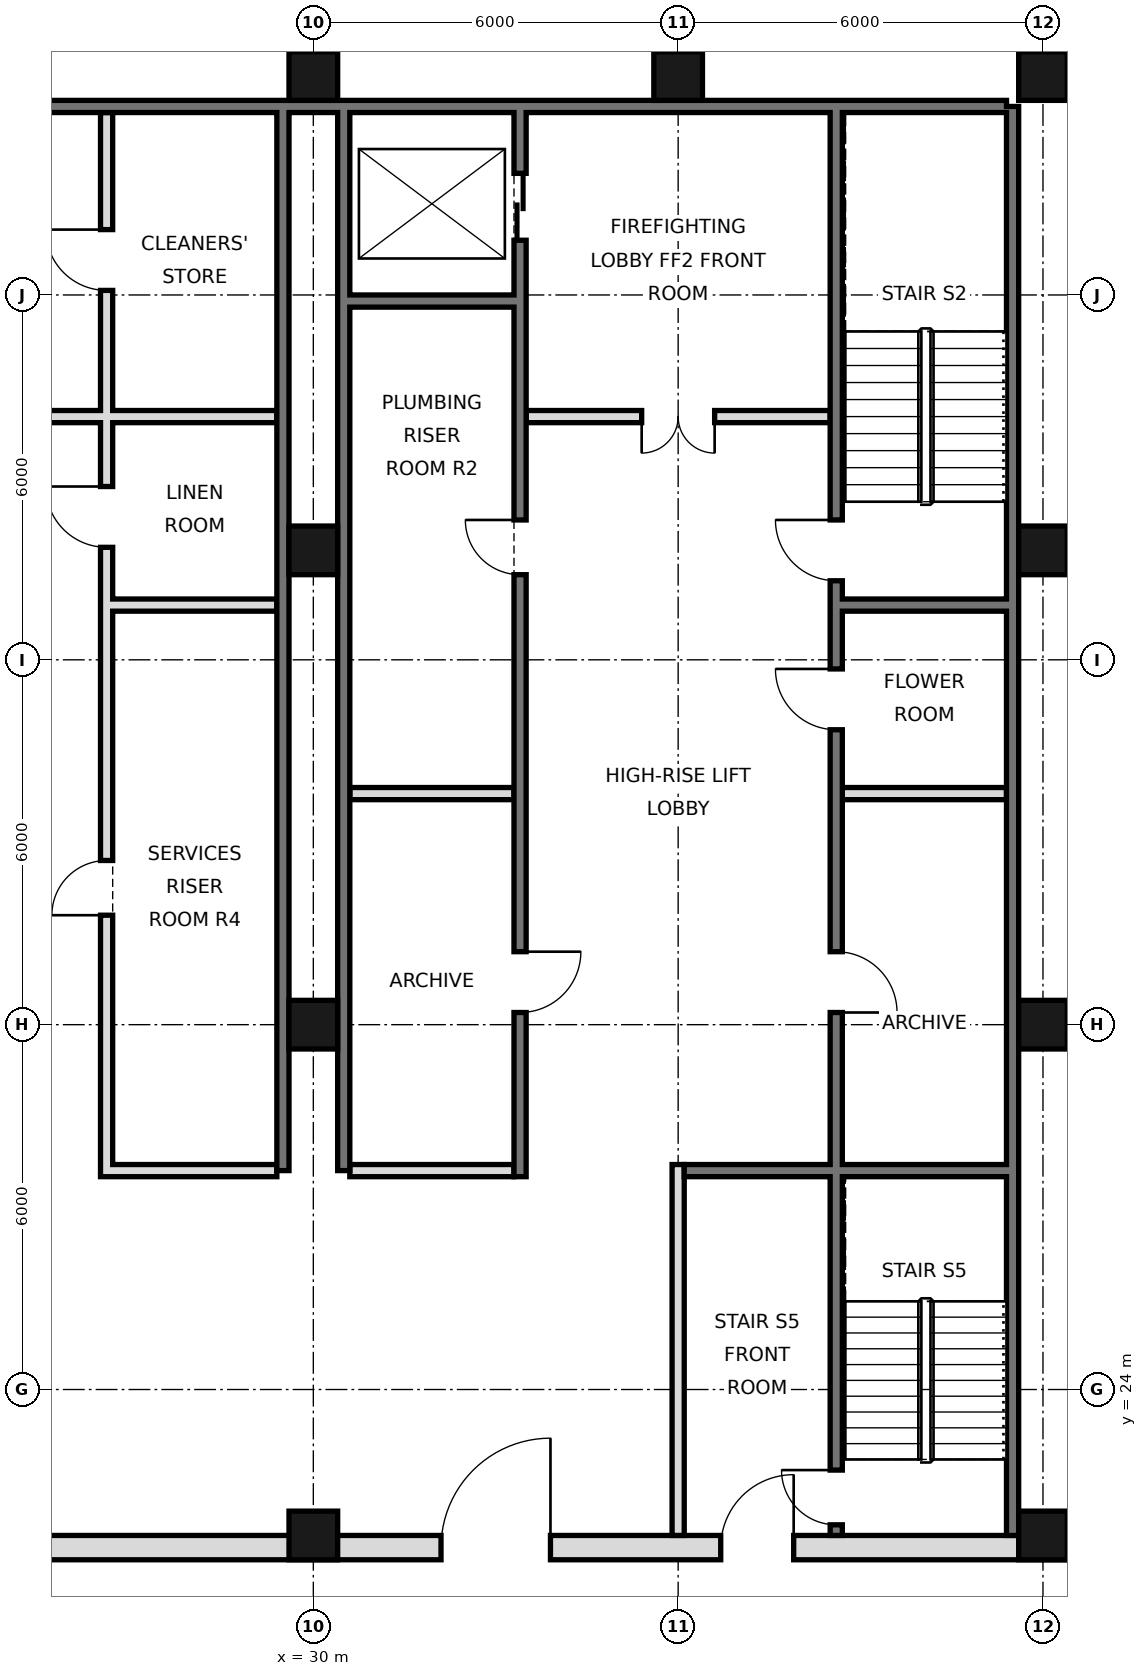
"""IFC4 building model, lengths in metres.
Left out: names, types, materials, properties, quantities, classifications, styles, units other than length and angle.
Written with IfcOpenShell. Run it as: python <this file> out.ifc"""

import sys

from ifc_helpers import new_model, si_unit, direction, frame, frame_2d, origin, origin_2d, place, context, subcontext, project, spatial, rectangle, hollow_rectangle, extrude, element, fill, save


model = new_model("IFC4")
c1 = context("Model", 3, precision=1e-05, world=origin(), true_north=direction((0.0, 1.0)))
c2 = subcontext(c1, "Body", "Model", "MODEL_VIEW")
j1 = project(units=[si_unit("LENGTHUNIT", "METRE"), si_unit("PLANEANGLEUNIT", "RADIAN")], contexts=[c1])
p1 = place(None, origin())
s1 = spatial("IfcSite", under=j1, at=p1, CompositionType="ELEMENT")
p2 = place(p1, origin())
s2 = spatial("IfcBuilding", under=s1, at=p2, CompositionType="ELEMENT")
p3 = place(p2, frame((0.0, 0.0, 49.8)))
s3 = spatial("IfcBuildingStorey", under=s2, at=p3, CompositionType="ELEMENT", Elevation=49.8)
for number, where, z_axis, x_axis in (
    (1, (30.0, 21.6, 0.0), (0.0, 0.0, 1.0), (1.0, 0.0, 0.0)),
    (2, (30.0, 30.0, 0.0), (0.0, 0.0, 1.0), (1.0, 0.0, 0.0)),
    (3, (30.0, 37.8, 0.0), (0.0, 0.0, 1.0), (1.0, 0.0, 0.0)),
    (4, (30.0, 45.6, 0.0), (0.0, 0.0, 1.0), (1.0, 0.0, 0.0)),
    (5, (36.0, 45.6, 0.0), (0.0, 0.0, 1.0), (1.0, 0.0, 0.0)),
    (6, (42.0, 21.6, 0.0), (0.0, 0.0, 1.0), (1.0, 0.0, 0.0)),
    (7, (42.0, 30.0, 0.0), (0.0, 0.0, 1.0), (1.0, 0.0, 0.0)),
    (8, (42.0, 37.8, 0.0), (0.0, 0.0, 1.0), (1.0, 0.0, 0.0)),
    (9, (42.0, 45.6, 0.0), (0.0, 0.0, 1.0), (1.0, 0.0, 0.0)),
):
    element("IfcColumn", number, at=place(p3, frame(where, z_axis=z_axis, x_axis=x_axis)), inside=s3, PredefinedType="COLUMN", context=c2, shape_type="SweptSolid", body=[
        extrude(hollow_rectangle(XDim=0.8, YDim=0.8, WallThickness=0.06, at=origin_2d()), origin(), (0.0, 0.0, 1.0), 3.6),
    ])
p4 = place(p3, frame((41.5, 21.6, 0.0), z_axis=(0.0, 0.0, 1.0), x_axis=(0.0, 1.0, 0.0)))
e10 = element("IfcWall", 10, at=p4, inside=s3, PredefinedType="SOLIDWALL", context=c2, shape_type="SweptSolid", body=[
    extrude(rectangle(XDim=23.5, YDim=0.2, at=frame_2d((11.75, 0.0))), origin(), (0.0, 0.0, 1.0), 3.42),
])
p5 = place(p3, frame((6.6, 45.1, 0.0), z_axis=(0.0, 0.0, 1.0), x_axis=(1.0, 0.0, 0.0)))
e11 = element("IfcWall", 11, at=p5, inside=s3, PredefinedType="SOLIDWALL", context=c2, shape_type="SweptSolid", body=[
    extrude(rectangle(XDim=34.8, YDim=0.2, at=frame_2d((17.4, 0.0))), origin(), (0.0, 0.0, 1.0), 3.42),
])
for number, where, z_axis, x_axis in (
    (12, (29.5, 27.6, 0.0), (0.0, 0.0, 1.0), (0.0, 1.0, 0.0)),
    (13, (30.5, 27.6, 0.0), (0.0, 0.0, 1.0), (0.0, 1.0, 0.0)),
):
    element("IfcWall", number, at=place(p3, frame(where, z_axis=z_axis, x_axis=x_axis)), inside=s3, PredefinedType="SOLIDWALL", context=c2, shape_type="SweptSolid", body=[
        extrude(rectangle(XDim=17.5, YDim=0.2, at=frame_2d((8.75, 0.0))), origin(), (0.0, 0.0, 1.0), 3.42),
    ])
p6 = place(p3, frame((5.6, 21.4, 0.0), z_axis=(0.0, 0.0, 1.0), x_axis=(1.0, 0.0, 0.0)))
e14 = element("IfcWall", 14, at=p6, inside=s3, PredefinedType="SOLIDWALL", context=c2, shape_type="SweptSolid", body=[
    extrude(rectangle(XDim=36.8, YDim=0.4, at=frame_2d((18.4, 0.0))), origin(), (0.0, 0.0, 1.0), 3.42),
])
p7 = place(p6, frame((8.5, 0.0, 0.0)))
e15 = element("IfcOpeningElement", 15, at=p7, cuts=e14, PredefinedType="OPENING", context=c2, shape_type="SweptSolid", body=[
    extrude(rectangle(XDim=1.8, YDim=2.1, at=frame_2d((0.9, 1.05))), frame((0.0, 0.21, 0.0), z_axis=(0.0, -1.0, 0.0), x_axis=(1.0, 0.0, 0.0)), (0.0, 0.0, 1.0), 0.42),
])
p8 = place(p6, frame((17.5, 0.0, 0.0)))
e16 = element("IfcOpeningElement", 16, at=p8, cuts=e14, PredefinedType="OPENING", context=c2, shape_type="SweptSolid", body=[
    extrude(rectangle(XDim=1.8, YDim=2.1, at=frame_2d((0.9, 1.05))), frame((0.0, 0.21, 0.0), z_axis=(0.0, -1.0, 0.0), x_axis=(1.0, 0.0, 0.0)), (0.0, 0.0, 1.0), 0.42),
])
p9 = place(p6, frame((26.5, 0.0, 0.0)))
e17 = element("IfcOpeningElement", 17, at=p9, cuts=e14, PredefinedType="OPENING", context=c2, shape_type="SweptSolid", body=[
    extrude(rectangle(XDim=1.8, YDim=2.1, at=frame_2d((0.9, 1.05))), frame((0.0, 0.21, 0.0), z_axis=(0.0, -1.0, 0.0), x_axis=(1.0, 0.0, 0.0)), (0.0, 0.0, 1.0), 0.42),
])
p10 = place(p6, frame((4.5, 0.0, 0.0)))
e18 = element("IfcOpeningElement", 18, at=p10, cuts=e14, PredefinedType="OPENING", context=c2, shape_type="SweptSolid", body=[
    extrude(rectangle(XDim=1.2, YDim=2.1, at=frame_2d((0.6, 1.05))), frame((0.0, 0.21, 0.0), z_axis=(0.0, -1.0, 0.0), x_axis=(1.0, 0.0, 0.0)), (0.0, 0.0, 1.0), 0.42),
])
p11 = place(p6, frame((31.1, 0.0, 0.0)))
e19 = element("IfcOpeningElement", 19, at=p11, cuts=e14, PredefinedType="OPENING", context=c2, shape_type="SweptSolid", body=[
    extrude(rectangle(XDim=1.2, YDim=2.1, at=frame_2d((0.6, 1.05))), frame((0.0, 0.21, 0.0), z_axis=(0.0, -1.0, 0.0), x_axis=(1.0, 0.0, 0.0)), (0.0, 0.0, 1.0), 0.42),
])
p12 = place(p3, frame((26.6, 27.5, 0.0), z_axis=(0.0, 0.0, 1.0), x_axis=(0.0, 1.0, 0.0)))
e20 = element("IfcWall", 20, at=p12, inside=s3, PredefinedType="SOLIDWALL", context=c2, shape_type="SweptSolid", body=[
    extrude(rectangle(XDim=17.5, YDim=0.2, at=frame_2d((8.75, 0.0))), origin(), (0.0, 0.0, 1.0), 3.42),
])
p13 = place(p12, frame((4.3, 0.0, 0.0)))
e21 = element("IfcOpeningElement", 21, at=p13, cuts=e20, PredefinedType="OPENING", context=c2, shape_type="SweptSolid", body=[
    extrude(rectangle(XDim=0.9, YDim=2.1, at=frame_2d((0.45, 1.05))), frame((0.0, 0.11, 0.0), z_axis=(0.0, -1.0, 0.0), x_axis=(1.0, 0.0, 0.0)), (0.0, 0.0, 1.0), 0.22),
])
p14 = place(p12, frame((10.35, 0.0, 0.0)))
e22 = element("IfcOpeningElement", 22, at=p14, cuts=e20, PredefinedType="OPENING", context=c2, shape_type="SweptSolid", body=[
    extrude(rectangle(XDim=1.0, YDim=2.1, at=frame_2d((0.5, 1.05))), frame((0.0, 0.11, 0.0), z_axis=(0.0, -1.0, 0.0), x_axis=(1.0, 0.0, 0.0)), (0.0, 0.0, 1.0), 0.22),
])
p15 = place(p12, frame((14.575, 0.0, 0.0)))
e23 = element("IfcOpeningElement", 23, at=p15, cuts=e20, PredefinedType="OPENING", context=c2, shape_type="SweptSolid", body=[
    extrude(rectangle(XDim=1.0, YDim=2.1, at=frame_2d((0.5, 1.05))), frame((0.0, 0.11, 0.0), z_axis=(0.0, -1.0, 0.0), x_axis=(1.0, 0.0, 0.0)), (0.0, 0.0, 1.0), 0.22),
])
p16 = place(p3, frame((33.4, 27.5, 0.0), z_axis=(0.0, 0.0, 1.0), x_axis=(0.0, 1.0, 0.0)))
e24 = element("IfcWall", 24, at=p16, inside=s3, PredefinedType="SOLIDWALL", context=c2, shape_type="SweptSolid", body=[
    extrude(rectangle(XDim=17.5, YDim=0.2, at=frame_2d((8.75, 0.0))), origin(), (0.0, 0.0, 1.0), 3.42),
])
p17 = place(p16, frame((15.4, 0.0, 0.0)))
e25 = element("IfcOpeningElement", 25, at=p17, cuts=e24, PredefinedType="OPENING", context=c2, shape_type="SweptSolid", body=[
    extrude(rectangle(XDim=1.1, YDim=2.1, at=frame_2d((0.55, 1.05))), frame((0.0, 0.11, 0.0), z_axis=(0.0, -1.0, 0.0), x_axis=(1.0, 0.0, 0.0)), (0.0, 0.0, 1.0), 0.22),
])
p18 = place(p16, frame((2.7, 0.0, 0.0)))
e26 = element("IfcOpeningElement", 26, at=p18, cuts=e24, PredefinedType="OPENING", context=c2, shape_type="SweptSolid", body=[
    extrude(rectangle(XDim=1.0, YDim=2.1, at=frame_2d((0.5, 1.05))), frame((0.0, 0.11, 0.0), z_axis=(0.0, -1.0, 0.0), x_axis=(1.0, 0.0, 0.0)), (0.0, 0.0, 1.0), 0.22),
])
p19 = place(p16, frame((9.9, 0.0, 0.0)))
e27 = element("IfcOpeningElement", 27, at=p19, cuts=e24, PredefinedType="OPENING", context=c2, shape_type="SweptSolid", body=[
    extrude(rectangle(XDim=0.9, YDim=2.1, at=frame_2d((0.45, 1.05))), frame((0.0, 0.11, 0.0), z_axis=(0.0, -1.0, 0.0), x_axis=(1.0, 0.0, 0.0)), (0.0, 0.0, 1.0), 0.22),
])
p20 = place(p3, frame((36.0, 21.6, 0.0), z_axis=(0.0, 0.0, 1.0), x_axis=(0.0, 1.0, 0.0)))
e28 = element("IfcWall", 28, at=p20, inside=s3, PredefinedType="PARTITIONING", context=c2, shape_type="SweptSolid", body=[
    extrude(rectangle(XDim=6.1, YDim=0.2, at=frame_2d((3.05, 0.0))), origin(), (0.0, 0.0, 1.0), 3.42),
])
p21 = place(p3, frame((38.6, 21.6, 0.0), z_axis=(0.0, 0.0, 1.0), x_axis=(0.0, 1.0, 0.0)))
e29 = element("IfcWall", 29, at=p21, inside=s3, PredefinedType="SOLIDWALL", context=c2, shape_type="SweptSolid", body=[
    extrude(rectangle(XDim=23.4, YDim=0.2, at=frame_2d((11.7, 0.0))), origin(), (0.0, 0.0, 1.0), 3.42),
])
p22 = place(p21, frame((8.6, 0.0, 0.0)))
e30 = element("IfcOpeningElement", 30, at=p22, cuts=e29, PredefinedType="OPENING", context=c2, shape_type="SweptSolid", body=[
    extrude(rectangle(XDim=1.0, YDim=2.1, at=frame_2d((0.5, 1.05))), frame((0.0, 0.11, 0.0), z_axis=(0.0, -1.0, 0.0), x_axis=(1.0, 0.0, 0.0)), (0.0, 0.0, 1.0), 0.22),
])
p23 = place(p21, frame((13.25, 0.0, 0.0)))
e31 = element("IfcOpeningElement", 31, at=p23, cuts=e29, PredefinedType="OPENING", context=c2, shape_type="SweptSolid", body=[
    extrude(rectangle(XDim=1.0, YDim=2.1, at=frame_2d((0.5, 1.05))), frame((0.0, 0.11, 0.0), z_axis=(0.0, -1.0, 0.0), x_axis=(1.0, 0.0, 0.0)), (0.0, 0.0, 1.0), 0.22),
])
p24 = place(p21, frame((15.7, 0.0, 0.0)))
e32 = element("IfcOpeningElement", 32, at=p24, cuts=e29, PredefinedType="OPENING", context=c2, shape_type="SweptSolid", body=[
    extrude(rectangle(XDim=1.0, YDim=2.1, at=frame_2d((0.5, 1.05))), frame((0.0, 0.11, 0.0), z_axis=(0.0, -1.0, 0.0), x_axis=(1.0, 0.0, 0.0)), (0.0, 0.0, 1.0), 0.22),
])
p25 = place(p21, frame((0.175, 0.0, 0.0)))
e33 = element("IfcOpeningElement", 33, at=p25, cuts=e29, PredefinedType="OPENING", context=c2, shape_type="SweptSolid", body=[
    extrude(rectangle(XDim=0.9, YDim=2.1, at=frame_2d((0.45, 1.05))), frame((0.0, 0.11, 0.0), z_axis=(0.0, -1.0, 0.0), x_axis=(1.0, 0.0, 0.0)), (0.0, 0.0, 1.0), 0.22),
])
p26 = place(p3, frame((26.7, 27.6, 0.0), z_axis=(0.0, 0.0, 1.0), x_axis=(1.0, 0.0, 0.0)))
e34 = element("IfcWall", 34, at=p26, inside=s3, PredefinedType="SOLIDWALL", context=c2, shape_type="SweptSolid", body=[
    extrude(rectangle(XDim=2.7, YDim=0.2, at=frame_2d((1.35, 0.0))), origin(), (0.0, 0.0, 1.0), 3.42),
])
p27 = place(p3, frame((30.6, 27.6, 0.0), z_axis=(0.0, 0.0, 1.0), x_axis=(1.0, 0.0, 0.0)))
e35 = element("IfcWall", 35, at=p27, inside=s3, PredefinedType="PARTITIONING", context=c2, shape_type="SweptSolid", body=[
    extrude(rectangle(XDim=2.7, YDim=0.2, at=frame_2d((1.35, 0.0))), origin(), (0.0, 0.0, 1.0), 3.42),
])
p28 = place(p3, frame((36.1, 27.6, 0.0), z_axis=(0.0, 0.0, 1.0), x_axis=(1.0, 0.0, 0.0)))
e36 = element("IfcWall", 36, at=p28, inside=s3, PredefinedType="SOLIDWALL", context=c2, shape_type="SweptSolid", body=[
    extrude(rectangle(XDim=5.3, YDim=0.2, at=frame_2d((2.65, 0.0))), origin(), (0.0, 0.0, 1.0), 3.42),
])
p29 = place(p3, frame((30.6, 33.8, 0.0), z_axis=(0.0, 0.0, 1.0), x_axis=(1.0, 0.0, 0.0)))
e37 = element("IfcWall", 37, at=p29, inside=s3, PredefinedType="SOLIDWALL", context=c2, shape_type="SweptSolid", body=[
    extrude(rectangle(XDim=2.7, YDim=0.2, at=frame_2d((1.35, 0.0))), origin(), (0.0, 0.0, 1.0), 3.42),
])
p30 = place(p3, frame((38.7, 33.8, 0.0), z_axis=(0.0, 0.0, 1.0), x_axis=(1.0, 0.0, 0.0)))
e38 = element("IfcWall", 38, at=p30, inside=s3, PredefinedType="PARTITIONING", context=c2, shape_type="SweptSolid", body=[
    extrude(rectangle(XDim=2.7, YDim=0.2, at=frame_2d((1.35, 0.0))), origin(), (0.0, 0.0, 1.0), 3.42),
])
for number, where, z_axis, x_axis in (
    (39, (26.7, 36.9, 0.0), (0.0, 0.0, 1.0), (1.0, 0.0, 0.0)),
    (40, (38.7, 36.9, 0.0), (0.0, 0.0, 1.0), (1.0, 0.0, 0.0)),
):
    element("IfcWall", number, at=place(p3, frame(where, z_axis=z_axis, x_axis=x_axis)), inside=s3, PredefinedType="SOLIDWALL", context=c2, shape_type="SweptSolid", body=[
        extrude(rectangle(XDim=2.7, YDim=0.2, at=frame_2d((1.35, 0.0))), origin(), (0.0, 0.0, 1.0), 3.42),
    ])
p31 = place(p3, frame((21.5, 40.0, 0.0), z_axis=(0.0, 0.0, 1.0), x_axis=(1.0, 0.0, 0.0)))
e41 = element("IfcWall", 41, at=p31, inside=s3, PredefinedType="PARTITIONING", context=c2, shape_type="SweptSolid", body=[
    extrude(rectangle(XDim=7.9, YDim=0.2, at=frame_2d((3.95, 0.0))), origin(), (0.0, 0.0, 1.0), 3.42),
])
p32 = place(p31, frame((1.9, 0.0, 0.0)))
e42 = element("IfcOpeningElement", 42, at=p32, cuts=e41, PredefinedType="OPENING", context=c2, shape_type="SweptSolid", body=[
    extrude(rectangle(XDim=1.2, YDim=2.1, at=frame_2d((0.6, 1.05))), frame((0.0, 0.11, 0.0), z_axis=(0.0, -1.0, 0.0), x_axis=(1.0, 0.0, 0.0)), (0.0, 0.0, 1.0), 0.22),
])
p33 = place(p3, frame((33.5, 40.0, 0.0), z_axis=(0.0, 0.0, 1.0), x_axis=(1.0, 0.0, 0.0)))
e43 = element("IfcWall", 43, at=p33, inside=s3, PredefinedType="PARTITIONING", context=c2, shape_type="SweptSolid", body=[
    extrude(rectangle(XDim=5.0, YDim=0.2, at=frame_2d((2.5, 0.0))), origin(), (0.0, 0.0, 1.0), 3.42),
])
p34 = place(p33, frame((1.9, 0.0, 0.0)))
e44 = element("IfcOpeningElement", 44, at=p34, cuts=e43, PredefinedType="OPENING", context=c2, shape_type="SweptSolid", body=[
    extrude(rectangle(XDim=1.2, YDim=2.1, at=frame_2d((0.6, 1.05))), frame((0.0, 0.11, 0.0), z_axis=(0.0, -1.0, 0.0), x_axis=(1.0, 0.0, 0.0)), (0.0, 0.0, 1.0), 0.22),
])
p35 = place(p3, frame((30.6, 41.9, 0.0), z_axis=(0.0, 0.0, 1.0), x_axis=(1.0, 0.0, 0.0)))
e45 = element("IfcWall", 45, at=p35, inside=s3, PredefinedType="SOLIDWALL", context=c2, shape_type="SweptSolid", body=[
    extrude(rectangle(XDim=2.7, YDim=0.2, at=frame_2d((1.35, 0.0))), origin(), (0.0, 0.0, 1.0), 3.42),
])
p36 = place(p9, frame((1.8, 0.0, 0.0), z_axis=(0.0, 0.0, 1.0), x_axis=(-1.0, 0.0, 0.0)))
e46 = element("IfcDoor", 46, at=p36, inside=s3, OperationType="SINGLE_SWING_LEFT", PredefinedType="DOOR", context=c2, shape_type="SweptSolid", body=[
    extrude(rectangle(XDim=1.8, YDim=2.1, at=frame_2d((0.9, 1.05))), frame((0.0, 0.025, 0.0), z_axis=(0.0, -1.0, 0.0), x_axis=(1.0, 0.0, 0.0)), (0.0, 0.0, 1.0), 0.05),
])
fill(e17, e46)
p37 = place(p11, frame((1.2, 0.0, 0.0), z_axis=(0.0, 0.0, 1.0), x_axis=(-1.0, 0.0, 0.0)))
e47 = element("IfcDoor", 47, at=p37, inside=s3, OperationType="SINGLE_SWING_LEFT", PredefinedType="DOOR", context=c2, shape_type="SweptSolid", body=[
    extrude(rectangle(XDim=1.2, YDim=2.1, at=frame_2d((0.6, 1.05))), frame((0.0, 0.025, 0.0), z_axis=(0.0, -1.0, 0.0), x_axis=(1.0, 0.0, 0.0)), (0.0, 0.0, 1.0), 0.05),
])
fill(e19, e47)
p38 = place(p34, frame((1.2, 0.0, 0.0), z_axis=(0.0, 0.0, 1.0), x_axis=(-1.0, 0.0, 0.0)))
e48 = element("IfcDoor", 48, at=p38, inside=s3, OperationType="DOUBLE_DOOR_SINGLE_SWING", PredefinedType="DOOR", context=c2, shape_type="SweptSolid", body=[
    extrude(rectangle(XDim=1.2, YDim=2.1, at=frame_2d((0.6, 1.05))), frame((0.0, 0.025, 0.0), z_axis=(0.0, -1.0, 0.0), x_axis=(1.0, 0.0, 0.0)), (0.0, 0.0, 1.0), 0.05),
])
fill(e44, e48)
p39 = place(p17, origin())
e49 = element("IfcDoor", 49, at=p39, inside=s3, OperationType="DOUBLE_DOOR_SLIDING", PredefinedType="DOOR", context=c2, shape_type="SweptSolid", body=[
    extrude(rectangle(XDim=1.1, YDim=2.1, at=frame_2d((0.55, 1.05))), frame((0.0, 0.025, 0.0), z_axis=(0.0, -1.0, 0.0), x_axis=(1.0, 0.0, 0.0)), (0.0, 0.0, 1.0), 0.05),
])
fill(e25, e49)
p40 = place(p22, frame((1.0, 0.0, 0.0), z_axis=(0.0, 0.0, 1.0), x_axis=(-1.0, 0.0, 0.0)))
e50 = element("IfcDoor", 50, at=p40, inside=s3, OperationType="SINGLE_SWING_RIGHT", PredefinedType="DOOR", context=c2, shape_type="SweptSolid", body=[
    extrude(rectangle(XDim=1.0, YDim=2.1, at=frame_2d((0.5, 1.05))), frame((0.0, 0.025, 0.0), z_axis=(0.0, -1.0, 0.0), x_axis=(1.0, 0.0, 0.0)), (0.0, 0.0, 1.0), 0.05),
])
fill(e30, e50)
p41 = place(p23, frame((1.0, 0.0, 0.0), z_axis=(0.0, 0.0, 1.0), x_axis=(-1.0, 0.0, 0.0)))
e51 = element("IfcDoor", 51, at=p41, inside=s3, OperationType="SINGLE_SWING_LEFT", PredefinedType="DOOR", context=c2, shape_type="SweptSolid", body=[
    extrude(rectangle(XDim=1.0, YDim=2.1, at=frame_2d((0.5, 1.05))), frame((0.0, 0.025, 0.0), z_axis=(0.0, -1.0, 0.0), x_axis=(1.0, 0.0, 0.0)), (0.0, 0.0, 1.0), 0.05),
])
fill(e31, e51)
p42 = place(p18, origin())
e52 = element("IfcDoor", 52, at=p42, inside=s3, OperationType="SINGLE_SWING_RIGHT", PredefinedType="DOOR", context=c2, shape_type="SweptSolid", body=[
    extrude(rectangle(XDim=1.0, YDim=2.1, at=frame_2d((0.5, 1.05))), frame((0.0, 0.025, 0.0), z_axis=(0.0, -1.0, 0.0), x_axis=(1.0, 0.0, 0.0)), (0.0, 0.0, 1.0), 0.05),
])
fill(e26, e52)
p43 = place(p24, frame((1.0, 0.0, 0.0), z_axis=(0.0, 0.0, 1.0), x_axis=(-1.0, 0.0, 0.0)))
e53 = element("IfcDoor", 53, at=p43, inside=s3, OperationType="SINGLE_SWING_LEFT", PredefinedType="DOOR", context=c2, shape_type="SweptSolid", body=[
    extrude(rectangle(XDim=1.0, YDim=2.1, at=frame_2d((0.5, 1.05))), frame((0.0, 0.025, 0.0), z_axis=(0.0, -1.0, 0.0), x_axis=(1.0, 0.0, 0.0)), (0.0, 0.0, 1.0), 0.05),
])
fill(e32, e53)
p44 = place(p25, frame((0.9, 0.0, 0.0), z_axis=(0.0, 0.0, 1.0), x_axis=(-1.0, 0.0, 0.0)))
e54 = element("IfcDoor", 54, at=p44, inside=s3, OperationType="SINGLE_SWING_LEFT", PredefinedType="DOOR", context=c2, shape_type="SweptSolid", body=[
    extrude(rectangle(XDim=0.9, YDim=2.1, at=frame_2d((0.45, 1.05))), frame((0.0, 0.025, 0.0), z_axis=(0.0, -1.0, 0.0), x_axis=(1.0, 0.0, 0.0)), (0.0, 0.0, 1.0), 0.05),
])
fill(e33, e54)
p45 = place(p19, frame((0.9, 0.0, 0.0), z_axis=(0.0, 0.0, 1.0), x_axis=(-1.0, 0.0, 0.0)))
e55 = element("IfcDoor", 55, at=p45, inside=s3, OperationType="SINGLE_SWING_LEFT", PredefinedType="DOOR", context=c2, shape_type="SweptSolid", body=[
    extrude(rectangle(XDim=0.9, YDim=2.1, at=frame_2d((0.45, 1.05))), frame((0.0, 0.025, 0.0), z_axis=(0.0, -1.0, 0.0), x_axis=(1.0, 0.0, 0.0)), (0.0, 0.0, 1.0), 0.05),
])
fill(e27, e55)
p46 = place(p13, origin())
e56 = element("IfcDoor", 56, at=p46, inside=s3, OperationType="SINGLE_SWING_LEFT", PredefinedType="DOOR", context=c2, shape_type="SweptSolid", body=[
    extrude(rectangle(XDim=0.9, YDim=2.1, at=frame_2d((0.45, 1.05))), frame((0.0, 0.025, 0.0), z_axis=(0.0, -1.0, 0.0), x_axis=(1.0, 0.0, 0.0)), (0.0, 0.0, 1.0), 0.05),
])
fill(e21, e56)
p47 = place(p14, frame((1.0, 0.0, 0.0), z_axis=(0.0, 0.0, 1.0), x_axis=(-1.0, 0.0, 0.0)))
e57 = element("IfcDoor", 57, at=p47, inside=s3, OperationType="SINGLE_SWING_LEFT", PredefinedType="DOOR", context=c2, shape_type="SweptSolid", body=[
    extrude(rectangle(XDim=1.0, YDim=2.1, at=frame_2d((0.5, 1.05))), frame((0.0, 0.025, 0.0), z_axis=(0.0, -1.0, 0.0), x_axis=(1.0, 0.0, 0.0)), (0.0, 0.0, 1.0), 0.05),
])
fill(e22, e57)
p48 = place(p15, frame((1.0, 0.0, 0.0), z_axis=(0.0, 0.0, 1.0), x_axis=(-1.0, 0.0, 0.0)))
e58 = element("IfcDoor", 58, at=p48, inside=s3, OperationType="SINGLE_SWING_LEFT", PredefinedType="DOOR", context=c2, shape_type="SweptSolid", body=[
    extrude(rectangle(XDim=1.0, YDim=2.1, at=frame_2d((0.5, 1.05))), frame((0.0, 0.025, 0.0), z_axis=(0.0, -1.0, 0.0), x_axis=(1.0, 0.0, 0.0)), (0.0, 0.0, 1.0), 0.05),
])
fill(e23, e58)
save(model, sys.argv[1])
